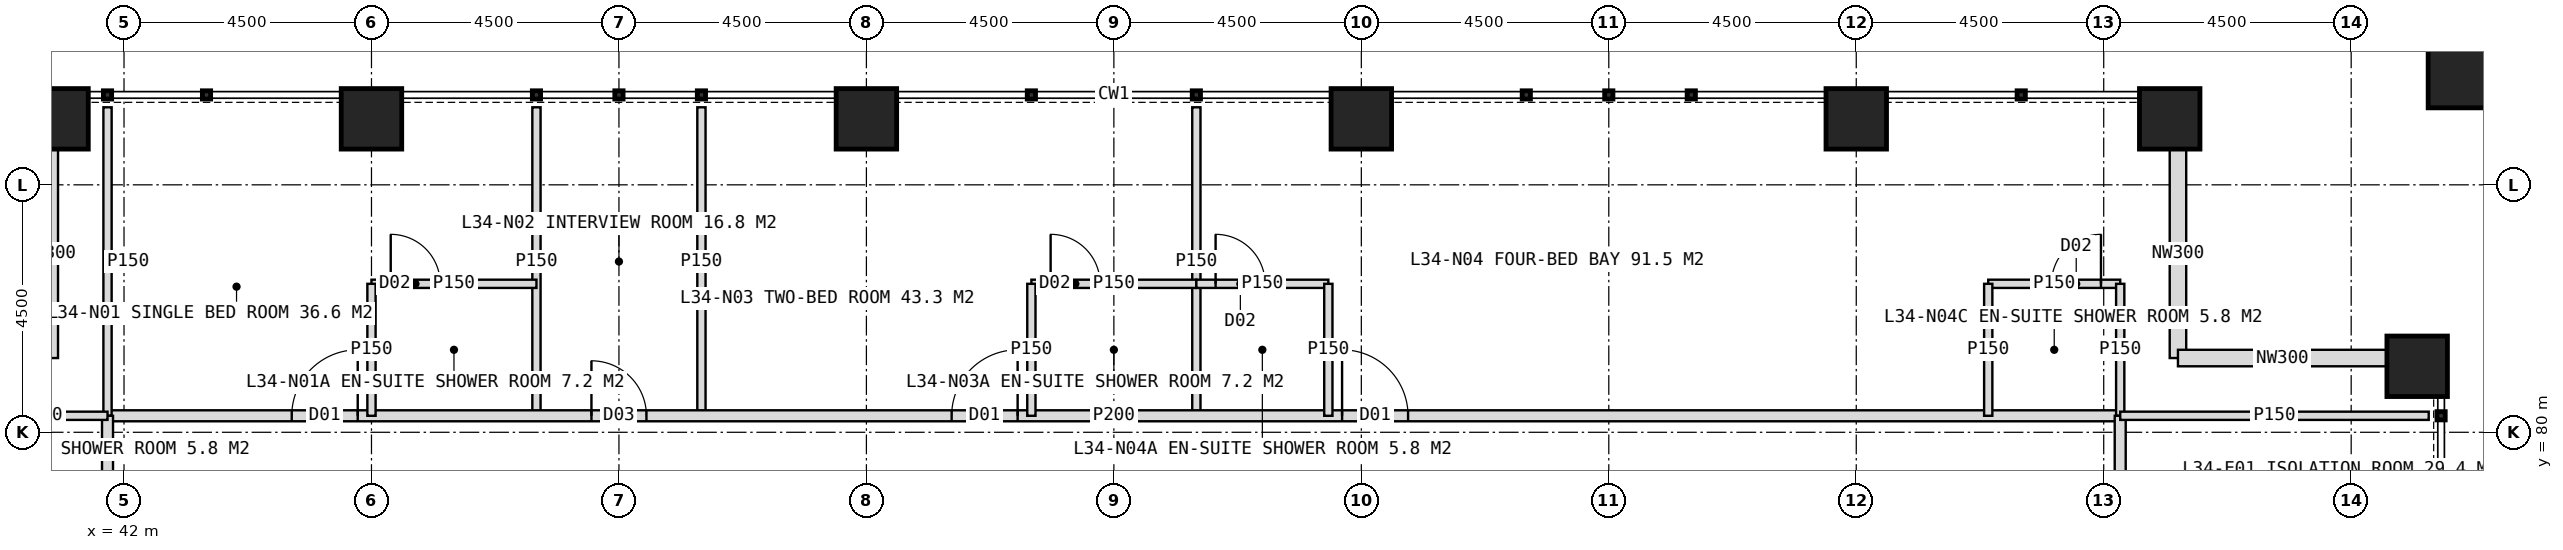
"""IFC4 building model, lengths in metres.
Left out: names, types, materials, properties, quantities, classifications, styles, units other than length and angle.
Written with IfcOpenShell. Run it as: python <this file> out.ifc"""

import sys

from ifc_helpers import new_model, si_unit, direction, frame, frame_2d, origin, origin_2d, place, context, subcontext, project, spatial, rectangle, hollow_rectangle, extrude, element, fill, save


model = new_model("IFC4")
c1 = context("Model", 3, precision=1e-05, world=origin(), true_north=direction((0.0, 1.0)))
c2 = subcontext(c1, "Body", "Model", "MODEL_VIEW")
j1 = project(units=[si_unit("LENGTHUNIT", "METRE"), si_unit("PLANEANGLEUNIT", "RADIAN")], contexts=[c1])
p1 = place(None, origin())
s1 = spatial("IfcSite", under=j1, at=p1, CompositionType="ELEMENT")
p2 = place(p1, origin())
s2 = spatial("IfcBuilding", under=s1, at=p2, CompositionType="ELEMENT")
p3 = place(p2, frame((0.0, 0.0, 144.0)))
s3 = spatial("IfcBuildingStorey", under=s2, at=p3, CompositionType="ELEMENT", Elevation=144.0)
for number, where, z_axis, x_axis in (
    (1, (40.8, 85.7, 0.0), (0.0, 0.0, 1.0), (1.0, 0.0, 0.0)),
    (2, (46.5, 85.7, 0.0), (0.0, 0.0, 1.0), (1.0, 0.0, 0.0)),
    (3, (55.5, 85.7, 0.0), (0.0, 0.0, 1.0), (1.0, 0.0, 0.0)),
    (4, (64.5, 85.7, 0.0), (0.0, 0.0, 1.0), (1.0, 0.0, 0.0)),
    (5, (73.5, 85.7, 0.0), (0.0, 0.0, 1.0), (1.0, 0.0, 0.0)),
    (6, (79.2, 85.7, 0.0), (0.0, 0.0, 1.0), (1.0, 0.0, 0.0)),
    (7, (83.7, 81.2, 0.0), (0.0, 0.0, 1.0), (1.0, 0.0, 0.0)),
):
    element("IfcColumn", number, at=place(p3, frame(where, z_axis=z_axis, x_axis=x_axis)), inside=s3, PredefinedType="COLUMN", context=c2, shape_type="SweptSolid", body=[
        extrude(hollow_rectangle(XDim=1.1, YDim=1.1, WallThickness=0.1, at=origin_2d()), origin(), (0.0, 0.0, 1.0), 4.0),
    ])
p4 = place(p3, frame((84.6, 86.6, 0.0), z_axis=(0.0, 0.0, 1.0), x_axis=(1.0, 0.0, 0.0)))
e8 = element("IfcColumn", 8, at=p4, inside=s3, PredefinedType="COLUMN", context=c2, shape_type="SweptSolid", body=[
    extrude(hollow_rectangle(XDim=1.4, YDim=1.4, WallThickness=0.08, at=origin_2d()), origin(), (0.0, 0.0, 1.0), 4.0),
])
for number, where, z_axis, x_axis in (
    (9, (79.35, 85.15, 0.0), (0.0, 0.0, 1.0), (0.0, -1.0, 0.0)),
    (10, (79.35, 81.35, 0.0), (0.0, 0.0, 1.0), (1.0, 0.0, 0.0)),
    (11, (40.65, 81.35, 0.0), (0.0, 0.0, 1.0), (0.0, 1.0, 0.0)),
):
    element("IfcWall", number, at=place(p3, frame(where, z_axis=z_axis, x_axis=x_axis)), inside=s3, PredefinedType="ELEMENTEDWALL", context=c2, shape_type="SweptSolid", body=[
        extrude(rectangle(XDim=3.8, YDim=0.3, at=frame_2d((1.9, 0.0))), origin(), (0.0, 0.0, 1.0), 4.0),
    ])
for number, where, z_axis, x_axis in (
    (12, (49.5, 80.3, 0.0), (0.0, 0.0, 1.0), (0.0, 1.0, 0.0)),
    (13, (52.5, 80.3, 0.0), (0.0, 0.0, 1.0), (0.0, 1.0, 0.0)),
    (14, (61.5, 80.3, 0.0), (0.0, 0.0, 1.0), (0.0, 1.0, 0.0)),
):
    element("IfcWall", number, at=place(p3, frame(where, z_axis=z_axis, x_axis=x_axis)), inside=s3, PredefinedType="PARTITIONING", context=c2, shape_type="SweptSolid", body=[
        extrude(rectangle(XDim=5.61, YDim=0.15, at=frame_2d((2.805, 0.0))), origin(), (0.0, 0.0, 1.0), 3.75),
    ])
p5 = place(p3, frame((41.7, 80.3, 0.0), z_axis=(0.0, 0.0, 1.0), x_axis=(1.0, 0.0, 0.0)))
e15 = element("IfcWall", 15, at=p5, inside=s3, PredefinedType="PARTITIONING", context=c2, shape_type="SweptSolid", body=[
    extrude(rectangle(XDim=36.6, YDim=0.2, at=frame_2d((18.3, 0.0))), origin(), (0.0, 0.0, 1.0), 3.75),
])
p6 = place(p5, frame((3.35, 0.0, 0.0)))
e16 = element("IfcOpeningElement", 16, at=p6, cuts=e15, PredefinedType="OPENING", context=c2, shape_type="SweptSolid", body=[
    extrude(rectangle(XDim=1.2, YDim=2.2, at=frame_2d((0.6, 1.1))), frame((0.0, 0.11, 0.0), z_axis=(0.0, -1.0, 0.0), x_axis=(1.0, 0.0, 0.0)), (0.0, 0.0, 1.0), 0.22),
])
p7 = place(p5, frame((8.8, 0.0, 0.0)))
e17 = element("IfcOpeningElement", 17, at=p7, cuts=e15, PredefinedType="OPENING", context=c2, shape_type="SweptSolid", body=[
    extrude(rectangle(XDim=1.0, YDim=2.1, at=frame_2d((0.5, 1.05))), frame((0.0, 0.11, 0.0), z_axis=(0.0, -1.0, 0.0), x_axis=(1.0, 0.0, 0.0)), (0.0, 0.0, 1.0), 0.22),
])
p8 = place(p5, frame((15.35, 0.0, 0.0)))
e18 = element("IfcOpeningElement", 18, at=p8, cuts=e15, PredefinedType="OPENING", context=c2, shape_type="SweptSolid", body=[
    extrude(rectangle(XDim=1.2, YDim=2.2, at=frame_2d((0.6, 1.1))), frame((0.0, 0.11, 0.0), z_axis=(0.0, -1.0, 0.0), x_axis=(1.0, 0.0, 0.0)), (0.0, 0.0, 1.0), 0.22),
])
p9 = place(p5, frame((22.45, 0.0, 0.0)))
e19 = element("IfcOpeningElement", 19, at=p9, cuts=e15, PredefinedType="OPENING", context=c2, shape_type="SweptSolid", body=[
    extrude(rectangle(XDim=1.2, YDim=2.2, at=frame_2d((0.6, 1.1))), frame((0.0, 0.11, 0.0), z_axis=(0.0, -1.0, 0.0), x_axis=(1.0, 0.0, 0.0)), (0.0, 0.0, 1.0), 0.22),
])
p10 = place(p3, frame((41.7, 80.3, 0.0), z_axis=(0.0, 0.0, 1.0), x_axis=(0.0, 1.0, 0.0)))
e20 = element("IfcWall", 20, at=p10, inside=s3, PredefinedType="PARTITIONING", context=c2, shape_type="SweptSolid", body=[
    extrude(rectangle(XDim=5.61, YDim=0.15, at=frame_2d((2.805, 0.0))), origin(), (0.0, 0.0, 1.0), 3.75),
])
p11 = place(p3, frame((46.5, 82.7, 0.0), z_axis=(0.0, 0.0, 1.0), x_axis=(1.0, 0.0, 0.0)))
e21 = element("IfcWall", 21, at=p11, inside=s3, PredefinedType="PARTITIONING", context=c2, shape_type="SweptSolid", body=[
    extrude(rectangle(XDim=3.0, YDim=0.15, at=frame_2d((1.5, 0.0))), origin(), (0.0, 0.0, 1.0), 3.75),
])
p12 = place(p11, frame((0.35, 0.0, 0.0)))
e22 = element("IfcOpeningElement", 22, at=p12, cuts=e21, PredefinedType="OPENING", context=c2, shape_type="SweptSolid", body=[
    extrude(rectangle(XDim=0.9, YDim=2.1, at=frame_2d((0.45, 1.05))), frame((0.0, 0.085, 0.0), z_axis=(0.0, -1.0, 0.0), x_axis=(1.0, 0.0, 0.0)), (0.0, 0.0, 1.0), 0.17),
])
p13 = place(p3, frame((46.5, 80.3, 0.0), z_axis=(0.0, 0.0, 1.0), x_axis=(0.0, 1.0, 0.0)))
e23 = element("IfcWall", 23, at=p13, inside=s3, PredefinedType="PARTITIONING", context=c2, shape_type="SweptSolid", body=[
    extrude(rectangle(XDim=2.4, YDim=0.15, at=frame_2d((1.2, 0.0))), origin(), (0.0, 0.0, 1.0), 2.95),
])
p14 = place(p3, frame((58.5, 82.7, 0.0), z_axis=(0.0, 0.0, 1.0), x_axis=(1.0, 0.0, 0.0)))
e24 = element("IfcWall", 24, at=p14, inside=s3, PredefinedType="PARTITIONING", context=c2, shape_type="SweptSolid", body=[
    extrude(rectangle(XDim=3.0, YDim=0.15, at=frame_2d((1.5, 0.0))), origin(), (0.0, 0.0, 1.0), 3.75),
])
p15 = place(p14, frame((0.35, 0.0, 0.0)))
e25 = element("IfcOpeningElement", 25, at=p15, cuts=e24, PredefinedType="OPENING", context=c2, shape_type="SweptSolid", body=[
    extrude(rectangle(XDim=0.9, YDim=2.1, at=frame_2d((0.45, 1.05))), frame((0.0, 0.085, 0.0), z_axis=(0.0, -1.0, 0.0), x_axis=(1.0, 0.0, 0.0)), (0.0, 0.0, 1.0), 0.17),
])
p16 = place(p3, frame((58.5, 80.3, 0.0), z_axis=(0.0, 0.0, 1.0), x_axis=(0.0, 1.0, 0.0)))
e26 = element("IfcWall", 26, at=p16, inside=s3, PredefinedType="PARTITIONING", context=c2, shape_type="SweptSolid", body=[
    extrude(rectangle(XDim=2.4, YDim=0.15, at=frame_2d((1.2, 0.0))), origin(), (0.0, 0.0, 1.0), 3.75),
])
p17 = place(p3, frame((61.5, 82.7, 0.0), z_axis=(0.0, 0.0, 1.0), x_axis=(1.0, 0.0, 0.0)))
e27 = element("IfcWall", 27, at=p17, inside=s3, PredefinedType="PARTITIONING", context=c2, shape_type="SweptSolid", body=[
    extrude(rectangle(XDim=2.4, YDim=0.15, at=frame_2d((1.2, 0.0))), origin(), (0.0, 0.0, 1.0), 3.75),
])
p18 = place(p17, frame((0.35, 0.0, 0.0)))
e28 = element("IfcOpeningElement", 28, at=p18, cuts=e27, PredefinedType="OPENING", context=c2, shape_type="SweptSolid", body=[
    extrude(rectangle(XDim=0.9, YDim=2.1, at=frame_2d((0.45, 1.05))), frame((0.0, 0.085, 0.0), z_axis=(0.0, -1.0, 0.0), x_axis=(1.0, 0.0, 0.0)), (0.0, 0.0, 1.0), 0.17),
])
p19 = place(p3, frame((63.9, 80.3, 0.0), z_axis=(0.0, 0.0, 1.0), x_axis=(0.0, 1.0, 0.0)))
e29 = element("IfcWall", 29, at=p19, inside=s3, PredefinedType="PARTITIONING", context=c2, shape_type="SweptSolid", body=[
    extrude(rectangle(XDim=2.4, YDim=0.15, at=frame_2d((1.2, 0.0))), origin(), (0.0, 0.0, 1.0), 3.75),
])
p20 = place(p3, frame((75.9, 82.7, 0.0), z_axis=(0.0, 0.0, 1.0), x_axis=(1.0, 0.0, 0.0)))
e30 = element("IfcWall", 30, at=p20, inside=s3, PredefinedType="PARTITIONING", context=c2, shape_type="SweptSolid", body=[
    extrude(rectangle(XDim=2.4, YDim=0.15, at=frame_2d((1.2, 0.0))), origin(), (0.0, 0.0, 1.0), 3.75),
])
p21 = place(p20, frame((1.15, 0.0, 0.0)))
e31 = element("IfcOpeningElement", 31, at=p21, cuts=e30, PredefinedType="OPENING", context=c2, shape_type="SweptSolid", body=[
    extrude(rectangle(XDim=0.9, YDim=2.1, at=frame_2d((0.45, 1.05))), frame((0.0, 0.085, 0.0), z_axis=(0.0, -1.0, 0.0), x_axis=(1.0, 0.0, 0.0)), (0.0, 0.0, 1.0), 0.17),
])
for number, where, z_axis, x_axis in (
    (32, (75.9, 80.3, 0.0), (0.0, 0.0, 1.0), (0.0, 1.0, 0.0)),
    (33, (78.3, 80.3, 0.0), (0.0, 0.0, 1.0), (0.0, 1.0, 0.0)),
):
    element("IfcWall", number, at=place(p3, frame(where, z_axis=z_axis, x_axis=x_axis)), inside=s3, PredefinedType="PARTITIONING", context=c2, shape_type="SweptSolid", body=[
        extrude(rectangle(XDim=2.4, YDim=0.15, at=frame_2d((1.2, 0.0))), origin(), (0.0, 0.0, 1.0), 3.75),
    ])
p22 = place(p3, frame((41.7, 43.7, 0.0), z_axis=(0.0, 0.0, 1.0), x_axis=(0.0, 1.0, 0.0)))
e34 = element("IfcWall", 34, at=p22, inside=s3, PredefinedType="PARTITIONING", context=c2, shape_type="SweptSolid", body=[
    extrude(rectangle(XDim=36.6, YDim=0.2, at=frame_2d((18.3, 0.0))), origin(), (0.0, 0.0, 1.0), 3.75),
])
p23 = place(p22, frame((3.35, 0.0, 0.0)))
e35 = element("IfcOpeningElement", 35, at=p23, cuts=e34, PredefinedType="OPENING", context=c2, shape_type="SweptSolid", body=[
    extrude(rectangle(XDim=1.2, YDim=2.2, at=frame_2d((0.6, 1.1))), frame((0.0, 0.11, 0.0), z_axis=(0.0, -1.0, 0.0), x_axis=(1.0, 0.0, 0.0)), (0.0, 0.0, 1.0), 0.22),
])
p24 = place(p22, frame((11.05, 0.0, 0.0)))
e36 = element("IfcOpeningElement", 36, at=p24, cuts=e34, PredefinedType="OPENING", context=c2, shape_type="SweptSolid", body=[
    extrude(rectangle(XDim=1.2, YDim=2.2, at=frame_2d((0.6, 1.1))), frame((0.0, 0.11, 0.0), z_axis=(0.0, -1.0, 0.0), x_axis=(1.0, 0.0, 0.0)), (0.0, 0.0, 1.0), 0.22),
])
p25 = place(p22, frame((16.3, 0.0, 0.0)))
e37 = element("IfcOpeningElement", 37, at=p25, cuts=e34, PredefinedType="OPENING", context=c2, shape_type="SweptSolid", body=[
    extrude(rectangle(XDim=1.0, YDim=2.1, at=frame_2d((0.5, 1.05))), frame((0.0, 0.11, 0.0), z_axis=(0.0, -1.0, 0.0), x_axis=(1.0, 0.0, 0.0)), (0.0, 0.0, 1.0), 0.22),
])
p26 = place(p22, frame((20.95, 0.0, 0.0)))
e38 = element("IfcOpeningElement", 38, at=p26, cuts=e34, PredefinedType="OPENING", context=c2, shape_type="SweptSolid", body=[
    extrude(rectangle(XDim=1.2, YDim=2.2, at=frame_2d((0.6, 1.1))), frame((0.0, 0.11, 0.0), z_axis=(0.0, -1.0, 0.0), x_axis=(1.0, 0.0, 0.0)), (0.0, 0.0, 1.0), 0.22),
])
p27 = place(p22, frame((32.75, 0.0, 0.0)))
e39 = element("IfcOpeningElement", 39, at=p27, cuts=e34, PredefinedType="OPENING", context=c2, shape_type="SweptSolid", body=[
    extrude(rectangle(XDim=1.2, YDim=2.2, at=frame_2d((0.6, 1.1))), frame((0.0, 0.11, 0.0), z_axis=(0.0, -1.0, 0.0), x_axis=(1.0, 0.0, 0.0)), (0.0, 0.0, 1.0), 0.22),
])
p28 = place(p3, frame((41.7, 80.3, 0.0), z_axis=(0.0, 0.0, 1.0), x_axis=(-1.0, 0.0, 0.0)))
e40 = element("IfcWall", 40, at=p28, inside=s3, PredefinedType="PARTITIONING", context=c2, shape_type="SweptSolid", body=[
    extrude(rectangle(XDim=2.4, YDim=0.15, at=frame_2d((1.2, 0.0))), origin(), (0.0, 0.0, 1.0), 3.75),
])
p29 = place(p3, frame((78.3, 80.3, 0.0), z_axis=(0.0, 0.0, 1.0), x_axis=(0.0, -1.0, 0.0)))
e41 = element("IfcWall", 41, at=p29, inside=s3, PredefinedType="PARTITIONING", context=c2, shape_type="SweptSolid", body=[
    extrude(rectangle(XDim=36.6, YDim=0.2, at=frame_2d((18.3, 0.0))), origin(), (0.0, 0.0, 1.0), 3.75),
])
p30 = place(p29, frame((3.35, 0.0, 0.0)))
e42 = element("IfcOpeningElement", 42, at=p30, cuts=e41, PredefinedType="OPENING", context=c2, shape_type="SweptSolid", body=[
    extrude(rectangle(XDim=1.2, YDim=2.2, at=frame_2d((0.6, 1.1))), frame((0.0, 0.11, 0.0), z_axis=(0.0, -1.0, 0.0), x_axis=(1.0, 0.0, 0.0)), (0.0, 0.0, 1.0), 0.22),
])
p31 = place(p29, frame((11.05, 0.0, 0.0)))
e43 = element("IfcOpeningElement", 43, at=p31, cuts=e41, PredefinedType="OPENING", context=c2, shape_type="SweptSolid", body=[
    extrude(rectangle(XDim=1.2, YDim=2.2, at=frame_2d((0.6, 1.1))), frame((0.0, 0.11, 0.0), z_axis=(0.0, -1.0, 0.0), x_axis=(1.0, 0.0, 0.0)), (0.0, 0.0, 1.0), 0.22),
])
p32 = place(p29, frame((16.3, 0.0, 0.0)))
e44 = element("IfcOpeningElement", 44, at=p32, cuts=e41, PredefinedType="OPENING", context=c2, shape_type="SweptSolid", body=[
    extrude(rectangle(XDim=1.0, YDim=2.1, at=frame_2d((0.5, 1.05))), frame((0.0, 0.11, 0.0), z_axis=(0.0, -1.0, 0.0), x_axis=(1.0, 0.0, 0.0)), (0.0, 0.0, 1.0), 0.22),
])
p33 = place(p29, frame((21.55, 0.0, 0.0)))
e45 = element("IfcOpeningElement", 45, at=p33, cuts=e41, PredefinedType="OPENING", context=c2, shape_type="SweptSolid", body=[
    extrude(rectangle(XDim=1.2, YDim=2.2, at=frame_2d((0.6, 1.1))), frame((0.0, 0.11, 0.0), z_axis=(0.0, -1.0, 0.0), x_axis=(1.0, 0.0, 0.0)), (0.0, 0.0, 1.0), 0.22),
])
p34 = place(p29, frame((32.75, 0.0, 0.0)))
e46 = element("IfcOpeningElement", 46, at=p34, cuts=e41, PredefinedType="OPENING", context=c2, shape_type="SweptSolid", body=[
    extrude(rectangle(XDim=1.2, YDim=2.2, at=frame_2d((0.6, 1.1))), frame((0.0, 0.11, 0.0), z_axis=(0.0, -1.0, 0.0), x_axis=(1.0, 0.0, 0.0)), (0.0, 0.0, 1.0), 0.22),
])
p35 = place(p3, frame((78.3, 80.3, 0.0), z_axis=(0.0, 0.0, 1.0), x_axis=(1.0, 0.0, 0.0)))
e47 = element("IfcWall", 47, at=p35, inside=s3, PredefinedType="PARTITIONING", context=c2, shape_type="SweptSolid", body=[
    extrude(rectangle(XDim=5.61, YDim=0.15, at=frame_2d((2.805, 0.0))), origin(), (0.0, 0.0, 1.0), 3.75),
])
p36 = place(p6, origin())
e48 = element("IfcDoor", 48, at=p36, inside=s3, OperationType="SINGLE_SWING_RIGHT", PredefinedType="DOOR", context=c2, shape_type="SweptSolid", body=[
    extrude(rectangle(XDim=1.2, YDim=2.2, at=frame_2d((0.6, 1.1))), frame((0.0, 0.025, 0.0), z_axis=(0.0, -1.0, 0.0), x_axis=(1.0, 0.0, 0.0)), (0.0, 0.0, 1.0), 0.05),
])
fill(e16, e48)
p37 = place(p12, origin())
e49 = element("IfcDoor", 49, at=p37, inside=s3, OperationType="SINGLE_SWING_LEFT", PredefinedType="DOOR", context=c2, shape_type="SweptSolid", body=[
    extrude(rectangle(XDim=0.9, YDim=2.1, at=frame_2d((0.45, 1.05))), frame((0.0, 0.025, 0.0), z_axis=(0.0, -1.0, 0.0), x_axis=(1.0, 0.0, 0.0)), (0.0, 0.0, 1.0), 0.05),
])
fill(e22, e49)
p38 = place(p7, origin())
e50 = element("IfcDoor", 50, at=p38, inside=s3, OperationType="SINGLE_SWING_LEFT", PredefinedType="DOOR", context=c2, shape_type="SweptSolid", body=[
    extrude(rectangle(XDim=1.0, YDim=2.1, at=frame_2d((0.5, 1.05))), frame((0.0, 0.025, 0.0), z_axis=(0.0, -1.0, 0.0), x_axis=(1.0, 0.0, 0.0)), (0.0, 0.0, 1.0), 0.05),
])
fill(e17, e50)
p39 = place(p8, origin())
e51 = element("IfcDoor", 51, at=p39, inside=s3, OperationType="SINGLE_SWING_RIGHT", PredefinedType="DOOR", context=c2, shape_type="SweptSolid", body=[
    extrude(rectangle(XDim=1.2, YDim=2.2, at=frame_2d((0.6, 1.1))), frame((0.0, 0.025, 0.0), z_axis=(0.0, -1.0, 0.0), x_axis=(1.0, 0.0, 0.0)), (0.0, 0.0, 1.0), 0.05),
])
fill(e18, e51)
p40 = place(p15, origin())
e52 = element("IfcDoor", 52, at=p40, inside=s3, OperationType="SINGLE_SWING_LEFT", PredefinedType="DOOR", context=c2, shape_type="SweptSolid", body=[
    extrude(rectangle(XDim=0.9, YDim=2.1, at=frame_2d((0.45, 1.05))), frame((0.0, 0.025, 0.0), z_axis=(0.0, -1.0, 0.0), x_axis=(1.0, 0.0, 0.0)), (0.0, 0.0, 1.0), 0.05),
])
fill(e25, e52)
p41 = place(p9, origin())
e53 = element("IfcDoor", 53, at=p41, inside=s3, OperationType="SINGLE_SWING_LEFT", PredefinedType="DOOR", context=c2, shape_type="SweptSolid", body=[
    extrude(rectangle(XDim=1.2, YDim=2.2, at=frame_2d((0.6, 1.1))), frame((0.0, 0.025, 0.0), z_axis=(0.0, -1.0, 0.0), x_axis=(1.0, 0.0, 0.0)), (0.0, 0.0, 1.0), 0.05),
])
fill(e19, e53)
p42 = place(p18, origin())
e54 = element("IfcDoor", 54, at=p42, inside=s3, OperationType="SINGLE_SWING_LEFT", PredefinedType="DOOR", context=c2, shape_type="SweptSolid", body=[
    extrude(rectangle(XDim=0.9, YDim=2.1, at=frame_2d((0.45, 1.05))), frame((0.0, 0.025, 0.0), z_axis=(0.0, -1.0, 0.0), x_axis=(1.0, 0.0, 0.0)), (0.0, 0.0, 1.0), 0.05),
])
fill(e28, e54)
p43 = place(p21, origin())
e55 = element("IfcDoor", 55, at=p43, inside=s3, OperationType="SINGLE_SWING_RIGHT", PredefinedType="DOOR", context=c2, shape_type="SweptSolid", body=[
    extrude(rectangle(XDim=0.9, YDim=2.1, at=frame_2d((0.45, 1.05))), frame((0.0, 0.025, 0.0), z_axis=(0.0, -1.0, 0.0), x_axis=(1.0, 0.0, 0.0)), (0.0, 0.0, 1.0), 0.05),
])
fill(e31, e55)
save(model, sys.argv[1])
